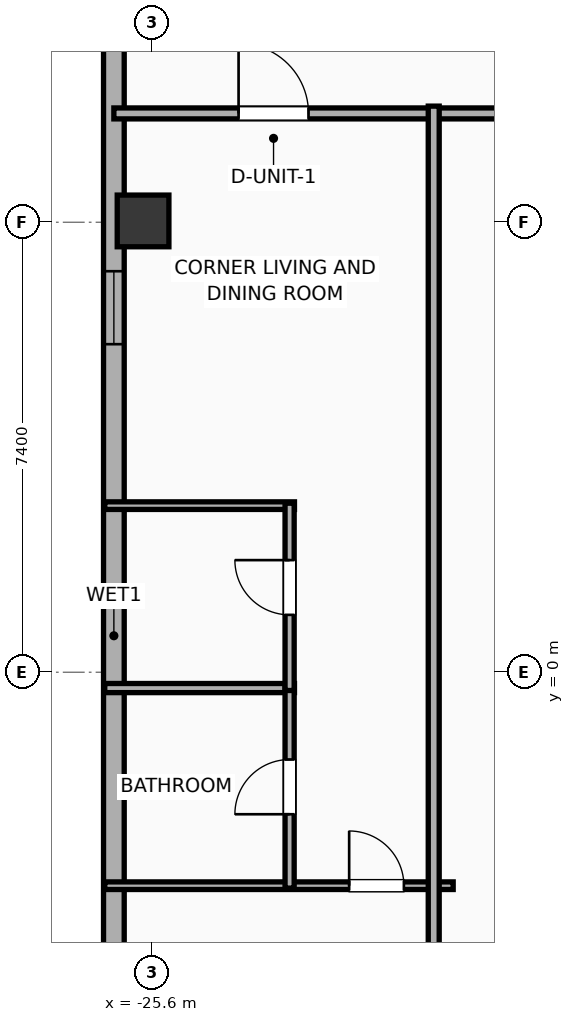
"""IFC4 building model, lengths in metres.
Left out: names, types, materials, properties, quantities, classifications, styles, units other than length and angle.
Written with IfcOpenShell. Run it as: python <this file> out.ifc"""

import sys

from ifc_helpers import new_model, si_unit, direction, frame, frame_2d, origin, origin_2d, place, context, subcontext, project, spatial, rectangle, hollow_rectangle, extrude, element, fill, save


model = new_model("IFC4")
c1 = context("Model", 3, precision=1e-05, world=origin(), true_north=direction((0.0, 1.0)))
c2 = subcontext(c1, "Body", "Model", "MODEL_VIEW")
j1 = project(units=[si_unit("LENGTHUNIT", "METRE"), si_unit("PLANEANGLEUNIT", "RADIAN")], contexts=[c1])
p1 = place(None, origin())
s1 = spatial("IfcSite", under=j1, at=p1, CompositionType="ELEMENT")
p2 = place(p1, origin())
s2 = spatial("IfcBuilding", under=s1, at=p2, CompositionType="ELEMENT")
p3 = place(p2, frame((0.0, 0.0, 215.8)))
s3 = spatial("IfcBuildingStorey", under=s2, at=p3, CompositionType="ELEMENT", Elevation=215.8)
p4 = place(p3, frame((-25.75, 7.422, 0.0), z_axis=(0.0, 0.0, 1.0), x_axis=(1.0, 0.0, 0.0)))
e1 = element("IfcColumn", 1, at=p4, inside=s3, PredefinedType="COLUMN", context=c2, shape_type="SweptSolid", body=[
    extrude(hollow_rectangle(XDim=0.85, YDim=0.85, WallThickness=0.028, at=origin_2d()), origin(), (0.0, 0.0, 1.0), 3.9),
])
p5 = place(p3, frame((-26.23, -15.383, 0.0), z_axis=(0.0, 0.0, 1.0), x_axis=(0.0, 1.0, 0.0)))
e2 = element("IfcWall", 2, at=p5, inside=s3, PredefinedType="ELEMENTEDWALL", context=c2, shape_type="SweptSolid", body=[
    extrude(rectangle(XDim=31.967, YDim=0.34, at=frame_2d((15.983, 0.0))), origin(), (0.0, 0.0, 1.0), 3.65),
])
p6 = place(p5, frame((29.55, 0.0, 0.75)))
e3 = element("IfcOpeningElement", 3, at=p6, cuts=e2, PredefinedType="OPENING", context=c2, shape_type="SweptSolid", body=[
    extrude(rectangle(XDim=1.2, YDim=2.05, at=frame_2d((0.6, 1.025))), frame((0.0, 0.18, 0.0), z_axis=(0.0, -1.0, 0.0), x_axis=(1.0, 0.0, 0.0)), (0.0, 0.0, 1.0), 0.36),
])
p7 = place(p5, frame((20.778, 0.0, 0.75)))
e4 = element("IfcOpeningElement", 4, at=p7, cuts=e2, PredefinedType="OPENING", context=c2, shape_type="SweptSolid", body=[
    extrude(rectangle(XDim=1.2, YDim=2.05, at=frame_2d((0.6, 1.025))), frame((0.0, 0.18, 0.0), z_axis=(0.0, -1.0, 0.0), x_axis=(1.0, 0.0, 0.0)), (0.0, 0.0, 1.0), 0.36),
])
p8 = place(p5, frame((7.323, 0.0, 0.75)))
e5 = element("IfcOpeningElement", 5, at=p8, cuts=e2, PredefinedType="OPENING", context=c2, shape_type="SweptSolid", body=[
    extrude(rectangle(XDim=1.2, YDim=2.05, at=frame_2d((0.6, 1.025))), frame((0.0, 0.18, 0.0), z_axis=(0.0, -1.0, 0.0), x_axis=(1.0, 0.0, 0.0)), (0.0, 0.0, 1.0), 0.36),
])
p9 = place(p3, frame((-26.23, 9.19, 0.0), z_axis=(0.0, 0.0, 1.0), x_axis=(1.0, 0.0, 0.0)))
e6 = element("IfcWall", 6, at=p9, inside=s3, PredefinedType="PARTITIONING", context=c2, shape_type="SweptSolid", body=[
    extrude(rectangle(XDim=16.35, YDim=0.18, at=frame_2d((8.175, 0.0))), origin(), (0.0, 0.0, 1.0), 3.65),
])
p10 = place(p9, frame((2.051, 0.0, 0.0)))
e7 = element("IfcOpeningElement", 7, at=p10, cuts=e6, PredefinedType="OPENING", context=c2, shape_type="SweptSolid", body=[
    extrude(rectangle(XDim=1.15, YDim=2.05, at=frame_2d((0.575, 1.025))), frame((0.0, 0.1, 0.0), z_axis=(0.0, -1.0, 0.0), x_axis=(1.0, 0.0, 0.0)), (0.0, 0.0, 1.0), 0.2),
])
p11 = place(p3, frame((-26.38, 2.74, 0.0), z_axis=(0.0, 0.0, 1.0), x_axis=(1.0, 0.0, 0.0)))
e8 = element("IfcWall", 8, at=p11, inside=s3, PredefinedType="PARTITIONING", context=c2, shape_type="SweptSolid", body=[
    extrude(rectangle(XDim=3.12, YDim=0.125, at=frame_2d((1.56, 0.0))), origin(), (0.0, 0.0, 1.0), 3.65),
])
p12 = place(p3, frame((-26.38, -0.26, 0.0), z_axis=(0.0, 0.0, 1.0), x_axis=(1.0, 0.0, 0.0)))
e9 = element("IfcWall", 9, at=p12, inside=s3, PredefinedType="PLUMBINGWALL", context=c2, shape_type="SweptSolid", body=[
    extrude(rectangle(XDim=3.12, YDim=0.15, at=frame_2d((1.56, 0.0))), origin(), (0.0, 0.0, 1.0), 3.65),
])
p13 = place(p3, frame((-26.38, -3.51, 0.0), z_axis=(0.0, 0.0, 1.0), x_axis=(1.0, 0.0, 0.0)))
e10 = element("IfcWall", 10, at=p13, inside=s3, PredefinedType="PARTITIONING", context=c2, shape_type="SweptSolid", body=[
    extrude(rectangle(XDim=5.73, YDim=0.125, at=frame_2d((2.865, 0.0))), origin(), (0.0, 0.0, 1.0), 3.65),
])
p14 = place(p13, frame((4.019, 0.0, 0.0)))
e11 = element("IfcOpeningElement", 11, at=p14, cuts=e10, PredefinedType="OPENING", context=c2, shape_type="SweptSolid", body=[
    extrude(rectangle(XDim=0.9, YDim=2.05, at=frame_2d((0.45, 1.025))), frame((0.0, 0.073, 0.0), z_axis=(0.0, -1.0, 0.0), x_axis=(1.0, 0.0, 0.0)), (0.0, 0.0, 1.0), 0.145),
])
p15 = place(p3, frame((-23.34, -3.55, 0.0), z_axis=(0.0, 0.0, 1.0), x_axis=(0.0, 1.0, 0.0)))
e12 = element("IfcWall", 12, at=p15, inside=s3, PredefinedType="PLUMBINGWALL", context=c2, shape_type="SweptSolid", body=[
    extrude(rectangle(XDim=3.33, YDim=0.15, at=frame_2d((1.665, 0.0))), origin(), (0.0, 0.0, 1.0), 3.65),
])
p16 = place(p15, frame((1.215, 0.0, 0.0)))
e13 = element("IfcOpeningElement", 13, at=p16, cuts=e12, PredefinedType="OPENING", context=c2, shape_type="SweptSolid", body=[
    extrude(rectangle(XDim=0.9, YDim=2.05, at=frame_2d((0.45, 1.025))), frame((0.0, 0.085, 0.0), z_axis=(0.0, -1.0, 0.0), x_axis=(1.0, 0.0, 0.0)), (0.0, 0.0, 1.0), 0.17),
])
p17 = place(p3, frame((-23.34, -0.3, 0.0), z_axis=(0.0, 0.0, 1.0), x_axis=(0.0, 1.0, 0.0)))
e14 = element("IfcWall", 14, at=p17, inside=s3, PredefinedType="PLUMBINGWALL", context=c2, shape_type="SweptSolid", body=[
    extrude(rectangle(XDim=3.08, YDim=0.15, at=frame_2d((1.54, 0.0))), origin(), (0.0, 0.0, 1.0), 3.65),
])
p18 = place(p17, frame((1.244, 0.0, 0.0)))
e15 = element("IfcOpeningElement", 15, at=p18, cuts=e14, PredefinedType="OPENING", context=c2, shape_type="SweptSolid", body=[
    extrude(rectangle(XDim=0.9, YDim=2.05, at=frame_2d((0.45, 1.025))), frame((0.0, 0.085, 0.0), z_axis=(0.0, -1.0, 0.0), x_axis=(1.0, 0.0, 0.0)), (0.0, 0.0, 1.0), 0.17),
])
p19 = place(p3, frame((-20.97, -9.31, 0.0), z_axis=(0.0, 0.0, 1.0), x_axis=(0.0, 1.0, 0.0)))
e16 = element("IfcWall", 16, at=p19, inside=s3, PredefinedType="PARTITIONING", context=c2, shape_type="SweptSolid", body=[
    extrude(rectangle(XDim=18.62, YDim=0.18, at=frame_2d((9.31, 0.0))), origin(), (0.0, 0.0, 1.0), 3.65),
])
p20 = place(p7, origin())
e17 = element("IfcWindow", 17, at=p20, inside=s3, PartitioningType="SINGLE_PANEL", PredefinedType="WINDOW", context=c2, shape_type="SweptSolid", body=[
    extrude(rectangle(XDim=1.2, YDim=2.05, at=frame_2d((0.6, 1.025))), frame((0.0, 0.03, 0.0), z_axis=(0.0, -1.0, 0.0), x_axis=(1.0, 0.0, 0.0)), (0.0, 0.0, 1.0), 0.06),
])
fill(e4, e17)
p21 = place(p10, origin())
e18 = element("IfcDoor", 18, at=p21, inside=s3, OperationType="SINGLE_SWING_LEFT", PredefinedType="DOOR", context=c2, shape_type="SweptSolid", body=[
    extrude(rectangle(XDim=1.15, YDim=2.05, at=frame_2d((0.575, 1.025))), frame((0.0, 0.025, 0.0), z_axis=(0.0, -1.0, 0.0), x_axis=(1.0, 0.0, 0.0)), (0.0, 0.0, 1.0), 0.05),
])
fill(e7, e18)
p22 = place(p14, origin())
e19 = element("IfcDoor", 19, at=p22, inside=s3, OperationType="SINGLE_SWING_LEFT", PredefinedType="DOOR", context=c2, shape_type="SweptSolid", body=[
    extrude(rectangle(XDim=0.9, YDim=2.05, at=frame_2d((0.45, 1.025))), frame((0.0, 0.025, 0.0), z_axis=(0.0, -1.0, 0.0), x_axis=(1.0, 0.0, 0.0)), (0.0, 0.0, 1.0), 0.05),
])
fill(e11, e19)
p23 = place(p16, origin())
e20 = element("IfcDoor", 20, at=p23, inside=s3, OperationType="SINGLE_SWING_LEFT", PredefinedType="DOOR", context=c2, shape_type="SweptSolid", body=[
    extrude(rectangle(XDim=0.9, YDim=2.05, at=frame_2d((0.45, 1.025))), frame((0.0, 0.025, 0.0), z_axis=(0.0, -1.0, 0.0), x_axis=(1.0, 0.0, 0.0)), (0.0, 0.0, 1.0), 0.05),
])
fill(e13, e20)
p24 = place(p18, origin())
e21 = element("IfcDoor", 21, at=p24, inside=s3, OperationType="SINGLE_SWING_RIGHT", PredefinedType="DOOR", context=c2, shape_type="SweptSolid", body=[
    extrude(rectangle(XDim=0.9, YDim=2.05, at=frame_2d((0.45, 1.025))), frame((0.0, 0.025, 0.0), z_axis=(0.0, -1.0, 0.0), x_axis=(1.0, 0.0, 0.0)), (0.0, 0.0, 1.0), 0.05),
])
fill(e15, e21)
save(model, sys.argv[1])
